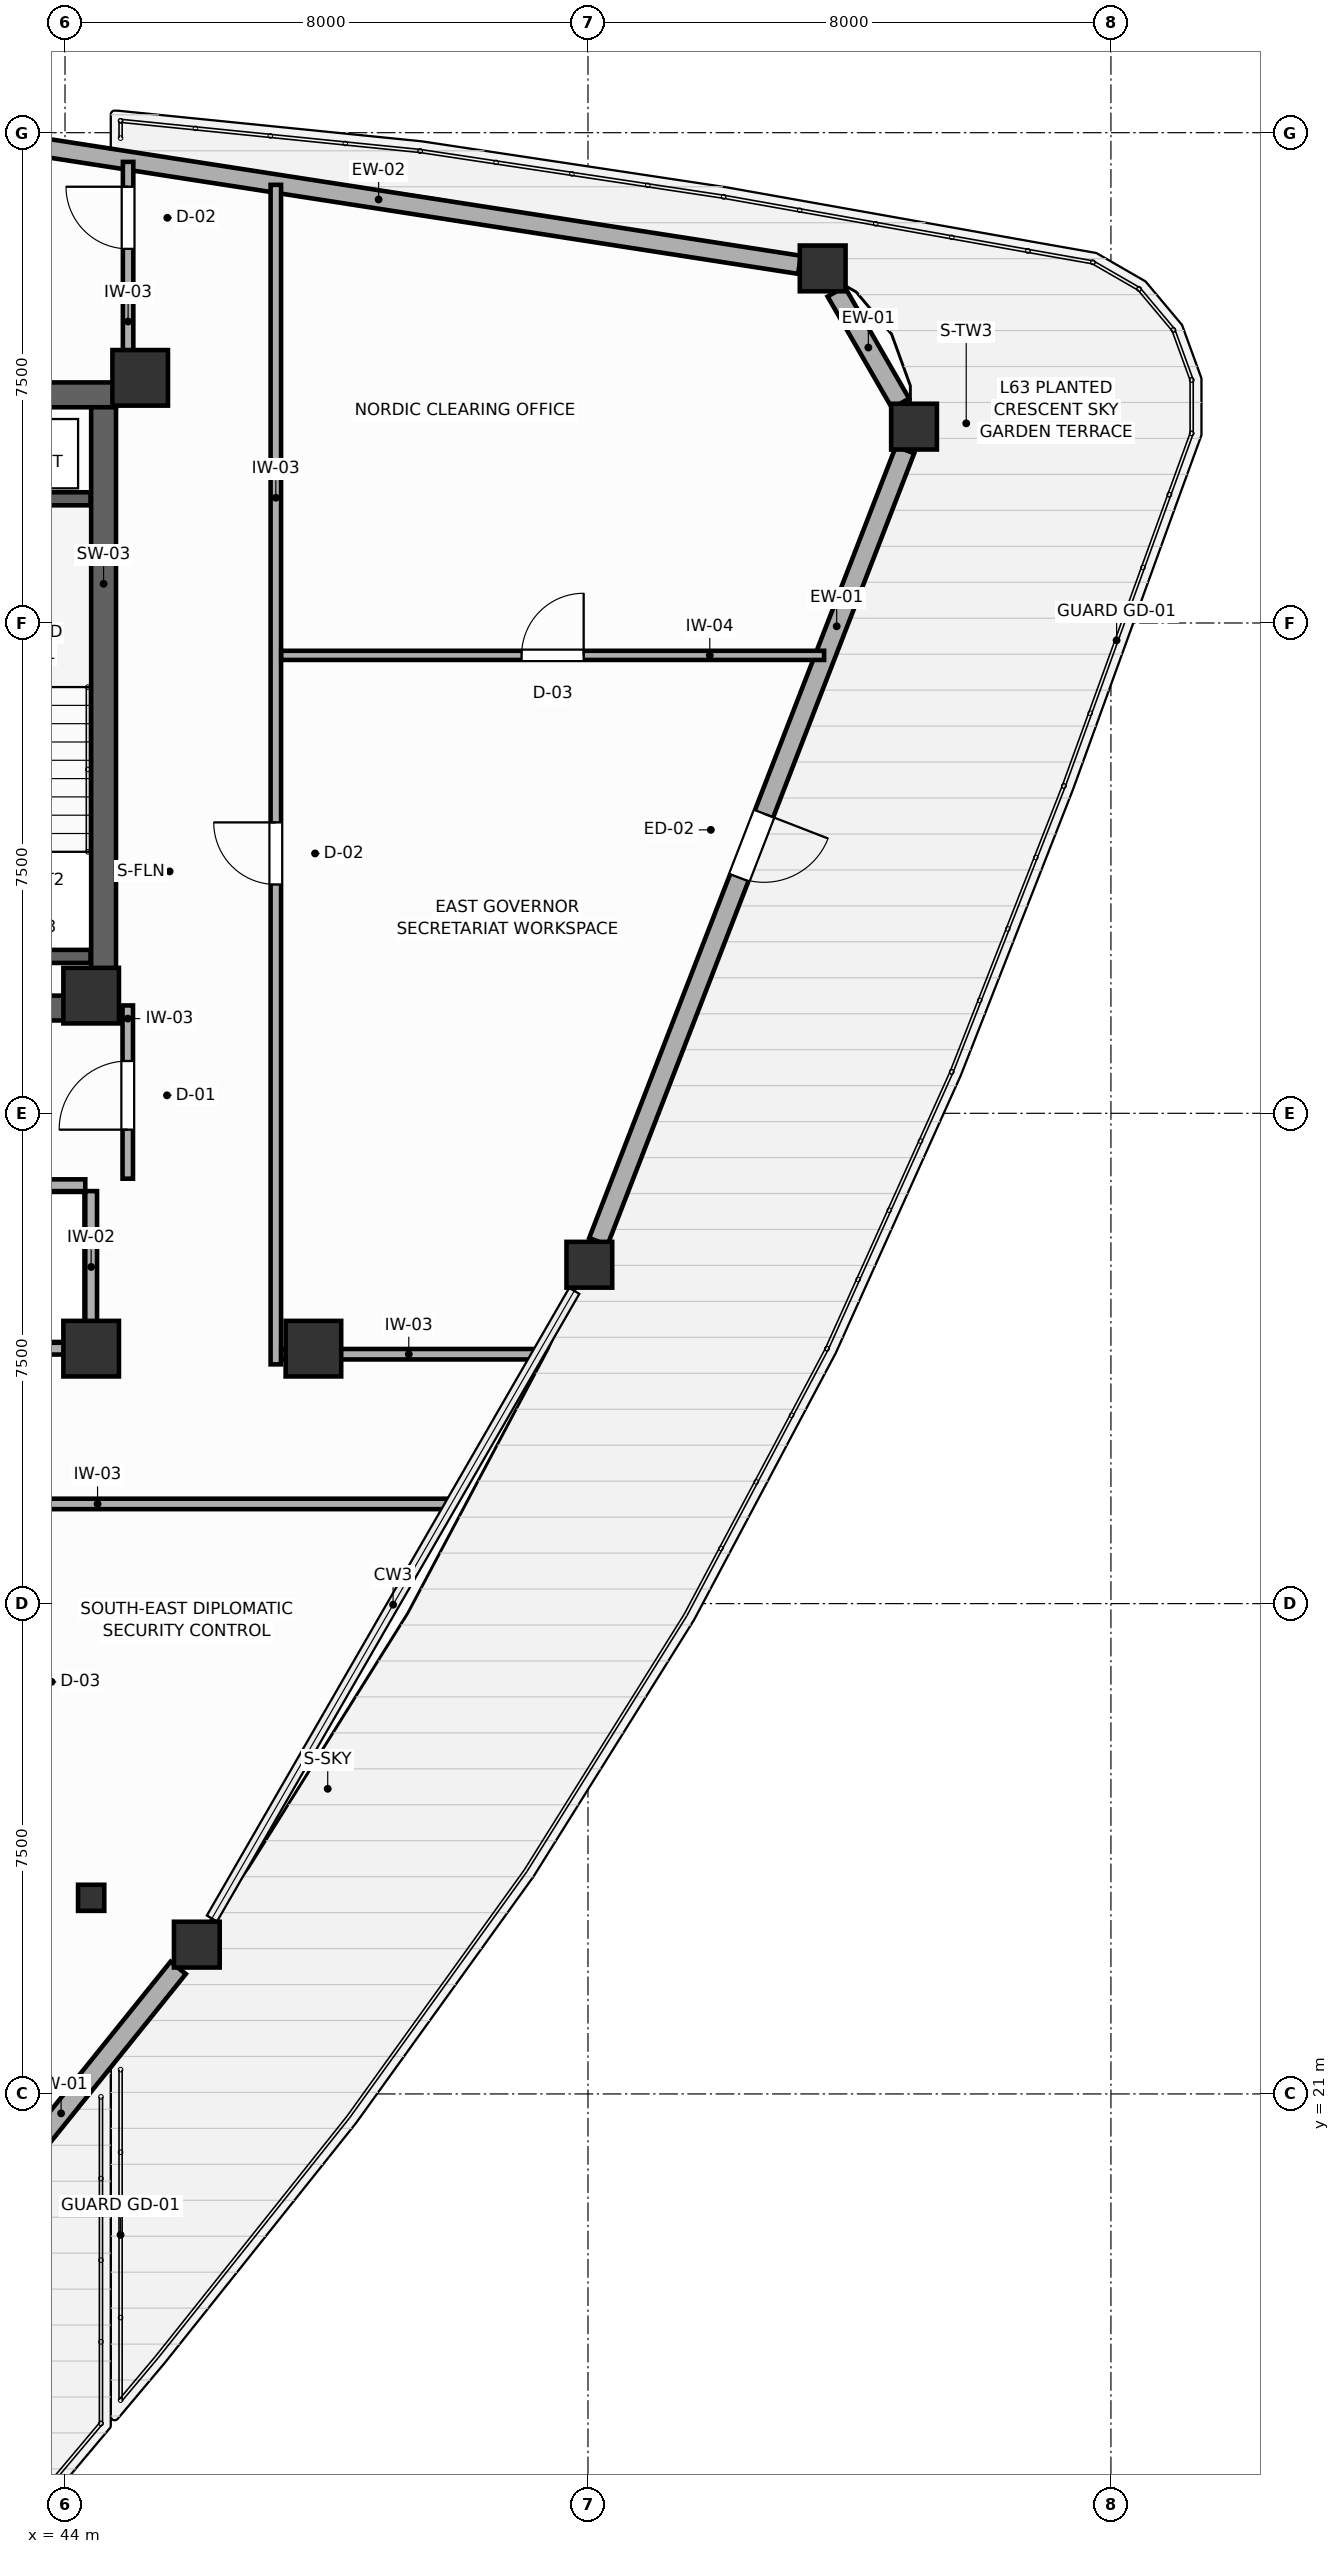
"""IFC4 building model, lengths in metres.
Left out: names, types, materials, properties, quantities, classifications, styles, units other than length and angle.
Written with IfcOpenShell. Run it as: python <this file> out.ifc"""

import sys

from ifc_helpers import new_model, si_unit, direction, frame, frame_2d, origin, origin_2d, place, context, subcontext, project, spatial, rectangle, i_section, extrude, source, transform, mapped, element, fill, save


model = new_model("IFC4")
c1 = context("Model", 3, precision=1e-05, world=origin(), true_north=direction((0.0, 1.0)))
c2 = subcontext(c1, "Body", "Model", "MODEL_VIEW")
j1 = project(units=[si_unit("LENGTHUNIT", "METRE"), si_unit("PLANEANGLEUNIT", "RADIAN")], contexts=[c1])
p1 = place(None, origin())
s1 = spatial("IfcSite", under=j1, at=p1, CompositionType="ELEMENT")
p2 = place(p1, origin())
s2 = spatial("IfcBuilding", under=s1, at=p2, CompositionType="ELEMENT")
p3 = place(p2, frame((0.0, 0.0, 243.0)))
s3 = spatial("IfcBuildingStorey", under=s2, at=p3, CompositionType="ELEMENT", Elevation=243.0)
p4 = place(p3, frame((27.22, 46.99, 0.0), z_axis=(0.0, 0.0, 1.0), x_axis=(1.0, 0.0, 0.0)))
e1 = element("IfcWall", 1, at=p4, inside=s3, PredefinedType="SHEAR", context=c2, shape_type="SweptSolid", body=[
    extrude(rectangle(XDim=17.56, YDim=0.38, at=frame_2d((8.78, 0.0))), origin(), (0.0, 0.0, 1.0), 3.6),
])
p5 = place(p3, frame((27.22, 37.61, 0.0), z_axis=(0.0, 0.0, 1.0), x_axis=(1.0, 0.0, 0.0)))
e2 = element("IfcWall", 2, at=p5, inside=s3, PredefinedType="SHEAR", context=c2, shape_type="SweptSolid", body=[
    extrude(rectangle(XDim=17.56, YDim=0.38, at=frame_2d((8.78, 0.0))), origin(), (0.0, 0.0, 1.0), 3.6),
])
p6 = place(p5, frame((4.805, 0.0, 0.0)))
e3 = element("IfcOpeningElement", 3, at=p6, cuts=e2, PredefinedType="OPENING", context=c2, shape_type="SweptSolid", body=[
    extrude(rectangle(XDim=1.05, YDim=2.1, at=frame_2d((0.525, 1.05))), frame((0.0, 0.2, 0.0), z_axis=(0.0, -1.0, 0.0), x_axis=(1.0, 0.0, 0.0)), (0.0, 0.0, 1.0), 0.4),
])
p7 = place(p5, frame((11.705, 0.0, 0.0)))
e4 = element("IfcOpeningElement", 4, at=p7, cuts=e2, PredefinedType="OPENING", context=c2, shape_type="SweptSolid", body=[
    extrude(rectangle(XDim=1.05, YDim=2.1, at=frame_2d((0.525, 1.05))), frame((0.0, 0.2, 0.0), z_axis=(0.0, -1.0, 0.0), x_axis=(1.0, 0.0, 0.0)), (0.0, 0.0, 1.0), 0.4),
])
p8 = place(p3, frame((44.59, 37.8, 0.0), z_axis=(0.0, 0.0, 1.0), x_axis=(0.0, 1.0, 0.0)))
e5 = element("IfcWall", 5, at=p8, inside=s3, PredefinedType="SHEAR", context=c2, shape_type="SweptSolid", body=[
    extrude(rectangle(XDim=9.0, YDim=0.38, at=frame_2d((4.5, 0.0))), origin(), (0.0, 0.0, 1.0), 3.6),
])
m1 = source(origin(), c2, "Body", "SweptSolid", [
    extrude(rectangle(XDim=0.85, YDim=0.85, at=origin_2d()), origin(), (0.0, 0.0, 1.0), 3.6),
])
for number, where, z_axis, x_axis in (
    (6, (45.15, 47.25, 0.0), (0.0, 0.0, 1.0), (1.0, 0.0, 0.0)),
    (7, (44.4, 37.8, 0.0), (0.0, 0.0, 1.0), (1.0, 0.0, 0.0)),
    (8, (44.4, 32.4, 0.0), (0.0, 0.0, 1.0), (1.0, 0.0, 0.0)),
    (9, (47.8, 32.4, 0.0), (0.0, 0.0, 1.0), (1.0, 0.0, 0.0)),
):
    element("IfcColumn", number, at=place(p3, frame(where, z_axis=z_axis, x_axis=x_axis)), inside=s3, PredefinedType="COLUMN", context=c2, shape_type="MappedRepresentation", body=[
        mapped(m1, transform((0.0, 0.0, 0.0), scale=1.0)),
    ])
m2 = source(origin(), c2, "Body", "SweptSolid", [
    extrude(i_section(OverallWidth=0.401, OverallDepth=0.399, WebThickness=0.022, FlangeThickness=0.036, FilletRadius=0.015, at=origin_2d()), origin(), (0.0, 0.0, 1.0), 3.6),
])
p9 = place(p3, frame((44.4, 24.0, 0.0), z_axis=(0.0, 0.0, 1.0), x_axis=(1.0, 0.0, 0.0)))
e10 = element("IfcColumn", 10, at=p9, inside=s3, PredefinedType="COLUMN", context=c2, shape_type="MappedRepresentation", body=[
    mapped(m2, transform((0.0, 0.0, 0.0), scale=1.0)),
])
m3 = source(origin(), c2, "Body", "SweptSolid", [
    extrude(rectangle(XDim=0.7, YDim=0.7, at=origin_2d()), origin(), (0.0, 0.0, 1.0), 3.6),
])
for number, where, z_axis, x_axis in (
    (11, (56.988, 46.504, 0.0), (0.0, 0.0, 1.0), (1.0, 0.0, 0.0)),
    (12, (55.59, 48.924, 0.0), (0.0, 0.0, 1.0), (1.0, 0.0, 0.0)),
    (13, (46.017, 23.284, 0.0), (0.0, 0.0, 1.0), (1.0, 0.0, 0.0)),
    (14, (52.021, 33.684, 0.0), (0.0, 0.0, 1.0), (1.0, 0.0, 0.0)),
):
    element("IfcColumn", number, at=place(p3, frame(where, z_axis=z_axis, x_axis=x_axis)), inside=s3, PredefinedType="COLUMN", context=c2, shape_type="MappedRepresentation", body=[
        mapped(m3, transform((0.0, 0.0, 0.0), scale=1.0)),
    ])
p10 = place(p3, frame((56.783, 46.859, 0.0), z_axis=(0.0, 0.0, 1.0), x_axis=(-0.499915072674, 0.866074431047, 0.0)))
e15 = element("IfcWall", 15, at=p10, inside=s3, PredefinedType="SOLIDWALL", context=c2, shape_type="SweptSolid", body=[
    extrude(rectangle(XDim=1.975, YDim=0.3, at=frame_2d((0.987, 0.0))), origin(), (0.0, 0.0, 1.0), 3.08),
])
p11 = place(p3, frame((55.235, 48.979, 0.0), z_axis=(0.0, 0.0, 1.0), x_axis=(-0.988170476673, 0.153359411293, 0.0)))
e16 = element("IfcWall", 16, at=p11, inside=s3, PredefinedType="SOLIDWALL", context=c2, shape_type="SweptSolid", body=[
    extrude(rectangle(XDim=13.03, YDim=0.28, at=frame_2d((6.515, 0.0))), origin(), (0.0, 0.0, 1.0), 3.08),
])
p12 = place(p3, frame((37.683, 12.927, 0.0), z_axis=(0.0, 0.0, 1.0), x_axis=(0.626898207352, 0.779101172903, 0.0)))
e17 = element("IfcWall", 17, at=p12, inside=s3, PredefinedType="SOLIDWALL", context=c2, shape_type="SweptSolid", body=[
    extrude(rectangle(XDim=12.837, YDim=0.3, at=frame_2d((6.418, 0.0))), origin(), (0.0, 0.0, 1.0), 3.05),
])
p13 = place(p12, frame((5.894, 0.0, 0.0)))
e18 = element("IfcOpeningElement", 18, at=p13, cuts=e17, PredefinedType="OPENING", context=c2, shape_type="SweptSolid", body=[
    extrude(rectangle(XDim=1.05, YDim=2.1, at=frame_2d((0.525, 1.05))), frame((0.0, 0.16, 0.0), z_axis=(0.0, -1.0, 0.0), x_axis=(1.0, 0.0, 0.0)), (0.0, 0.0, 1.0), 0.32),
])
p14 = place(p3, frame((52.158, 34.039, 0.0), z_axis=(0.0, 0.0, 1.0), x_axis=(0.361269378379, 0.93246149317, 0.0)))
e19 = element("IfcWall", 19, at=p14, inside=s3, PredefinedType="SOLIDWALL", context=c2, shape_type="SweptSolid", body=[
    extrude(rectangle(XDim=12.987, YDim=0.3, at=frame_2d((6.494, 0.0))), origin(), (0.0, 0.0, 1.0), 3.08),
])
p15 = place(p14, frame((5.969, 0.0, 0.0)))
e20 = element("IfcOpeningElement", 20, at=p15, cuts=e19, PredefinedType="OPENING", context=c2, shape_type="SweptSolid", body=[
    extrude(rectangle(XDim=1.05, YDim=2.1, at=frame_2d((0.525, 1.05))), frame((0.0, 0.16, 0.0), z_axis=(0.0, -1.0, 0.0), x_axis=(1.0, 0.0, 0.0)), (0.0, 0.0, 1.0), 0.32),
])
for number, where, z_axis, x_axis in (
    (21, (41.25, 45.4, 0.0), (0.0, 0.0, 1.0), (1.0, 0.0, 0.0)),
    (22, (41.25, 38.4, 0.0), (0.0, 0.0, 1.0), (1.0, 0.0, 0.0)),
):
    element("IfcWall", number, at=place(p3, frame(where, z_axis=z_axis, x_axis=x_axis)), inside=s3, PredefinedType="SHEAR", context=c2, shape_type="SweptSolid", body=[
        extrude(rectangle(XDim=3.14, YDim=0.2, at=frame_2d((1.57, 0.0))), origin(), (0.0, 0.0, 1.0), 3.6),
    ])
p16 = place(p3, frame((42.39, 34.9, 0.0), z_axis=(0.0, 0.0, 1.0), x_axis=(1.0, 0.0, 0.0)))
e23 = element("IfcWall", 23, at=p16, inside=s3, PredefinedType="PARTITIONING", context=c2, shape_type="SweptSolid", body=[
    extrude(rectangle(XDim=1.92, YDim=0.18, at=frame_2d((0.96, 0.0))), origin(), (0.0, 0.0, 1.0), 3.41),
])
p17 = place(p3, frame((42.39, 32.4, 0.0), z_axis=(0.0, 0.0, 1.0), x_axis=(1.0, 0.0, 0.0)))
e24 = element("IfcWall", 24, at=p17, inside=s3, PredefinedType="PARTITIONING", context=c2, shape_type="SweptSolid", body=[
    extrude(rectangle(XDim=1.92, YDim=0.18, at=frame_2d((0.96, 0.0))), origin(), (0.0, 0.0, 1.0), 3.08),
])
p18 = place(p3, frame((44.4, 32.49, 0.0), z_axis=(0.0, 0.0, 1.0), x_axis=(0.0, 1.0, 0.0)))
e25 = element("IfcWall", 25, at=p18, inside=s3, PredefinedType="PARTITIONING", context=c2, shape_type="SweptSolid", body=[
    extrude(rectangle(XDim=2.32, YDim=0.18, at=frame_2d((1.16, 0.0))), origin(), (0.0, 0.0, 1.0), 3.41),
])
p19 = place(p3, frame((44.96, 35.0, 0.0), z_axis=(0.0, 0.0, 1.0), x_axis=(0.0, 1.0, 0.0)))
e26 = element("IfcWall", 26, at=p19, inside=s3, PredefinedType="PARTITIONING", context=c2, shape_type="SweptSolid", body=[
    extrude(rectangle(XDim=2.65, YDim=0.16, at=frame_2d((1.325, 0.0))), origin(), (0.0, 0.0, 1.0), 3.41),
])
p20 = place(p19, frame((0.75, 0.0, 0.0)))
e27 = element("IfcOpeningElement", 27, at=p20, cuts=e26, PredefinedType="OPENING", context=c2, shape_type="SweptSolid", body=[
    extrude(rectangle(XDim=1.05, YDim=2.1, at=frame_2d((0.525, 1.05))), frame((0.0, 0.09, 0.0), z_axis=(0.0, -1.0, 0.0), x_axis=(1.0, 0.0, 0.0)), (0.0, 0.0, 1.0), 0.18),
])
p21 = place(p3, frame((47.225, 32.16, 0.0), z_axis=(0.0, 0.0, 1.0), x_axis=(0.0, 1.0, 0.0)))
e28 = element("IfcWall", 28, at=p21, inside=s3, PredefinedType="PARTITIONING", context=c2, shape_type="SweptSolid", body=[
    extrude(rectangle(XDim=18.042, YDim=0.16, at=frame_2d((9.021, 0.0))), origin(), (0.0, 0.0, 1.0), 3.41),
])
p22 = place(p21, frame((7.34, 0.0, 0.0)))
e29 = element("IfcOpeningElement", 29, at=p22, cuts=e28, PredefinedType="OPENING", context=c2, shape_type="SweptSolid", body=[
    extrude(rectangle(XDim=0.95, YDim=2.05, at=frame_2d((0.475, 1.025))), frame((0.0, 0.09, 0.0), z_axis=(0.0, -1.0, 0.0), x_axis=(1.0, 0.0, 0.0)), (0.0, 0.0, 1.0), 0.18),
])
p23 = place(p3, frame((39.107, 30.025, 0.0), z_axis=(0.0, 0.0, 1.0), x_axis=(1.0, 0.0, 0.0)))
e30 = element("IfcWall", 30, at=p23, inside=s3, PredefinedType="PARTITIONING", context=c2, shape_type="SweptSolid", body=[
    extrude(rectangle(XDim=10.782, YDim=0.16, at=frame_2d((5.391, 0.0))), origin(), (0.0, 0.0, 1.0), 3.41),
])
p24 = place(p3, frame((47.307, 32.315, 0.0), z_axis=(0.0, 0.0, 1.0), x_axis=(1.0, 0.0, 0.0)))
e31 = element("IfcWall", 31, at=p24, inside=s3, PredefinedType="PARTITIONING", context=c2, shape_type="SweptSolid", body=[
    extrude(rectangle(XDim=3.904, YDim=0.16, at=frame_2d((1.952, 0.0))), origin(), (0.0, 0.0, 1.0), 3.08),
])
p25 = place(p3, frame((44.965, 47.18, 0.0), z_axis=(0.0, 0.0, 1.0), x_axis=(0.0, 1.0, 0.0)))
e32 = element("IfcWall", 32, at=p25, inside=s3, PredefinedType="PARTITIONING", context=c2, shape_type="SweptSolid", body=[
    extrude(rectangle(XDim=3.373, YDim=0.16, at=frame_2d((1.687, 0.0))), origin(), (0.0, 0.0, 1.0), 3.41),
])
p26 = place(p25, frame((2.043, 0.0, 0.0)))
e33 = element("IfcOpeningElement", 33, at=p26, cuts=e32, PredefinedType="OPENING", context=c2, shape_type="SweptSolid", body=[
    extrude(rectangle(XDim=0.95, YDim=2.05, at=frame_2d((0.475, 1.025))), frame((0.0, 0.09, 0.0), z_axis=(0.0, -1.0, 0.0), x_axis=(1.0, 0.0, 0.0)), (0.0, 0.0, 1.0), 0.18),
])
p27 = place(p3, frame((47.307, 43.005, 0.0), z_axis=(0.0, 0.0, 1.0), x_axis=(1.0, 0.0, 0.0)))
e34 = element("IfcWall", 34, at=p27, inside=s3, PredefinedType="PARTITIONING", context=c2, shape_type="SweptSolid", body=[
    extrude(rectangle(XDim=8.305, YDim=0.14, at=frame_2d((4.153, 0.0))), origin(), (0.0, 0.0, 1.0), 3.41),
])
p28 = place(p27, frame((3.677, 0.0, 0.0)))
e35 = element("IfcOpeningElement", 35, at=p28, cuts=e34, PredefinedType="OPENING", context=c2, shape_type="SweptSolid", body=[
    extrude(rectangle(XDim=0.95, YDim=2.05, at=frame_2d((0.475, 1.025))), frame((0.0, 0.08, 0.0), z_axis=(0.0, -1.0, 0.0), x_axis=(1.0, 0.0, 0.0)), (0.0, 0.0, 1.0), 0.16),
])
p29 = place(p15, frame((1.05, 0.0, 0.0), z_axis=(0.0, 0.0, 1.0), x_axis=(-1.0, 0.0, 0.0)))
e36 = element("IfcDoor", 36, at=p29, inside=s3, OperationType="SINGLE_SWING_LEFT", PredefinedType="DOOR", context=c2, shape_type="SweptSolid", body=[
    extrude(rectangle(XDim=1.05, YDim=2.1, at=frame_2d((0.525, 1.05))), frame((0.0, 0.025, 0.0), z_axis=(0.0, -1.0, 0.0), x_axis=(1.0, 0.0, 0.0)), (0.0, 0.0, 1.0), 0.05),
])
fill(e20, e36)
p30 = place(p20, origin())
e37 = element("IfcDoor", 37, at=p30, inside=s3, OperationType="SINGLE_SWING_LEFT", PredefinedType="DOOR", context=c2, shape_type="SweptSolid", body=[
    extrude(rectangle(XDim=1.05, YDim=2.1, at=frame_2d((0.525, 1.05))), frame((0.0, 0.025, 0.0), z_axis=(0.0, -1.0, 0.0), x_axis=(1.0, 0.0, 0.0)), (0.0, 0.0, 1.0), 0.05),
])
fill(e27, e37)
p31 = place(p22, origin())
e38 = element("IfcDoor", 38, at=p31, inside=s3, OperationType="SINGLE_SWING_RIGHT", PredefinedType="DOOR", context=c2, shape_type="SweptSolid", body=[
    extrude(rectangle(XDim=0.95, YDim=2.05, at=frame_2d((0.475, 1.025))), frame((0.0, 0.025, 0.0), z_axis=(0.0, -1.0, 0.0), x_axis=(1.0, 0.0, 0.0)), (0.0, 0.0, 1.0), 0.05),
])
fill(e29, e38)
p32 = place(p26, origin())
e39 = element("IfcDoor", 39, at=p32, inside=s3, OperationType="SINGLE_SWING_RIGHT", PredefinedType="DOOR", context=c2, shape_type="SweptSolid", body=[
    extrude(rectangle(XDim=0.95, YDim=2.05, at=frame_2d((0.475, 1.025))), frame((0.0, 0.025, 0.0), z_axis=(0.0, -1.0, 0.0), x_axis=(1.0, 0.0, 0.0)), (0.0, 0.0, 1.0), 0.05),
])
fill(e33, e39)
p33 = place(p28, origin())
e40 = element("IfcDoor", 40, at=p33, inside=s3, OperationType="SINGLE_SWING_RIGHT", PredefinedType="DOOR", context=c2, shape_type="SweptSolid", body=[
    extrude(rectangle(XDim=0.95, YDim=2.05, at=frame_2d((0.475, 1.025))), frame((0.0, 0.025, 0.0), z_axis=(0.0, -1.0, 0.0), x_axis=(1.0, 0.0, 0.0)), (0.0, 0.0, 1.0), 0.05),
])
fill(e35, e40)
save(model, sys.argv[1])
